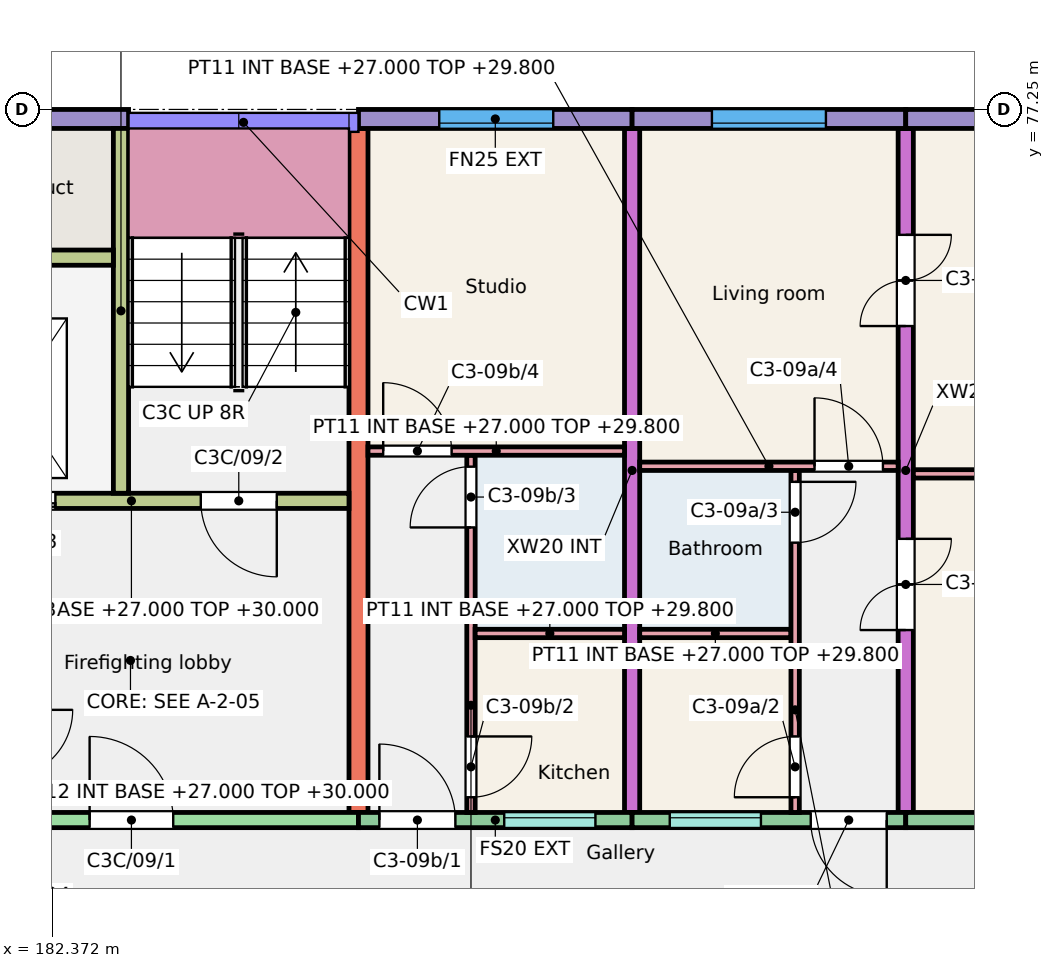
"""IFC4 building model, lengths in metres.
Left out: names, types, materials, properties, quantities, classifications, styles, units other than length and angle.
Written with IfcOpenShell. Run it as: python <this file> out.ifc"""

import sys

from ifc_helpers import new_model, si_unit, direction, frame, frame_2d, origin, place, context, subcontext, project, spatial, rectangle, extrude, element, fill, save


model = new_model("IFC4")
c1 = context("Model", 3, precision=1e-05, world=origin(), true_north=direction((0.0, 1.0)))
c2 = subcontext(c1, "Body", "Model", "MODEL_VIEW")
j1 = project(units=[si_unit("LENGTHUNIT", "METRE"), si_unit("PLANEANGLEUNIT", "RADIAN")], contexts=[c1])
p1 = place(None, origin())
s1 = spatial("IfcSite", under=j1, at=p1, CompositionType="ELEMENT")
p2 = place(p1, origin())
s2 = spatial("IfcBuilding", under=s1, at=p2, CompositionType="ELEMENT")
p3 = place(p2, frame((0.0, 0.0, 27.0)))
s3 = spatial("IfcBuildingStorey", under=s2, at=p3, CompositionType="ELEMENT", Elevation=27.0)
p4 = place(p3, frame((186.4, 68.0, 0.0), z_axis=(0.0, 0.0, 1.0), x_axis=(0.0, 1.0, 0.0)))
e1 = element("IfcWall", 1, at=p4, inside=s3, PredefinedType="SHEAR", context=c2, shape_type="SweptSolid", body=[
    extrude(rectangle(XDim=9.0, YDim=0.25, at=frame_2d((4.5, 0.0))), origin(), (0.0, 0.0, 1.0), 3.0),
])
p5 = place(p3, frame((190.0, 68.0, 0.0), z_axis=(0.0, 0.0, 1.0), x_axis=(0.0, 1.0, 0.0)))
e2 = element("IfcWall", 2, at=p5, inside=s3, PredefinedType="SHEAR", context=c2, shape_type="SweptSolid", body=[
    extrude(rectangle(XDim=9.0, YDim=0.2, at=frame_2d((4.5, 0.0))), origin(), (0.0, 0.0, 1.0), 3.0),
])
p6 = place(p3, frame((193.6, 68.0, 0.0), z_axis=(0.0, 0.0, 1.0), x_axis=(0.0, 1.0, 0.0)))
e3 = element("IfcWall", 3, at=p6, inside=s3, PredefinedType="SHEAR", context=c2, shape_type="SweptSolid", body=[
    extrude(rectangle(XDim=9.0, YDim=0.2, at=frame_2d((4.5, 0.0))), origin(), (0.0, 0.0, 1.0), 3.0),
])
p7 = place(p6, frame((2.4, 0.0, 0.0)))
e4 = element("IfcOpeningElement", 4, at=p7, cuts=e3, PredefinedType="OPENING", context=c2, shape_type="SweptSolid", body=[
    extrude(rectangle(XDim=1.2, YDim=2.1, at=frame_2d((0.6, 1.05))), frame((0.0, 0.11, 0.0), z_axis=(0.0, -1.0, 0.0), x_axis=(1.0, 0.0, 0.0)), (0.0, 0.0, 1.0), 0.22),
])
p8 = place(p6, frame((6.4, 0.0, 0.0)))
e5 = element("IfcOpeningElement", 5, at=p8, cuts=e3, PredefinedType="OPENING", context=c2, shape_type="SweptSolid", body=[
    extrude(rectangle(XDim=1.2, YDim=2.1, at=frame_2d((0.6, 1.05))), frame((0.0, 0.11, 0.0), z_axis=(0.0, -1.0, 0.0), x_axis=(1.0, 0.0, 0.0)), (0.0, 0.0, 1.0), 0.22),
])
p9 = place(p3, frame((180.4, 77.125, 0.0), z_axis=(0.0, 0.0, 1.0), x_axis=(1.0, 0.0, 0.0)))
e6 = element("IfcWall", 6, at=p9, inside=s3, PredefinedType="SOLIDWALL", context=c2, shape_type="SweptSolid", body=[
    extrude(rectangle(XDim=2.975, YDim=0.25, at=frame_2d((1.488, 0.0))), origin(), (0.0, 0.0, 1.0), 3.0),
])
p10 = place(p3, frame((180.55, 67.9, 0.0), z_axis=(0.0, 0.0, 1.0), x_axis=(1.0, 0.0, 0.0)))
e7 = element("IfcWall", 7, at=p10, inside=s3, PredefinedType="SHEAR", context=c2, shape_type="SweptSolid", body=[
    extrude(rectangle(XDim=5.85, YDim=0.2, at=frame_2d((2.925, 0.0))), origin(), (0.0, 0.0, 1.0), 3.0),
])
p11 = place(p10, frame((2.312, 0.0, 0.0)))
e8 = element("IfcOpeningElement", 8, at=p11, cuts=e7, PredefinedType="OPENING", context=c2, shape_type="SweptSolid", body=[
    extrude(rectangle(XDim=1.1, YDim=2.1, at=frame_2d((0.55, 1.05))), frame((0.0, 0.11, 0.0), z_axis=(0.0, -1.0, 0.0), x_axis=(1.0, 0.0, 0.0)), (0.0, 0.0, 1.0), 0.22),
])
p12 = place(p3, frame((180.55, 72.1, 0.0), z_axis=(0.0, 0.0, 1.0), x_axis=(1.0, 0.0, 0.0)))
e9 = element("IfcWall", 9, at=p12, inside=s3, PredefinedType="SHEAR", context=c2, shape_type="SweptSolid", body=[
    extrude(rectangle(XDim=5.725, YDim=0.2, at=frame_2d((2.862, 0.0))), origin(), (0.0, 0.0, 1.0), 3.0),
])
p13 = place(p12, frame((3.775, 0.0, 0.0)))
e10 = element("IfcOpeningElement", 10, at=p13, cuts=e9, PredefinedType="OPENING", context=c2, shape_type="SweptSolid", body=[
    extrude(rectangle(XDim=1.0, YDim=2.1, at=frame_2d((0.5, 1.05))), frame((0.0, 0.11, 0.0), z_axis=(0.0, -1.0, 0.0), x_axis=(1.0, 0.0, 0.0)), (0.0, 0.0, 1.0), 0.22),
])
p14 = place(p12, frame((0.762, 0.0, 0.0)))
e11 = element("IfcOpeningElement", 11, at=p14, cuts=e9, PredefinedType="OPENING", context=c2, shape_type="SweptSolid", body=[
    extrude(rectangle(XDim=1.1, YDim=2.1, at=frame_2d((0.55, 1.05))), frame((0.0, 0.11, 0.0), z_axis=(0.0, -1.0, 0.0), x_axis=(1.0, 0.0, 0.0)), (0.0, 0.0, 1.0), 0.22),
])
p15 = place(p3, frame((183.275, 72.2, 0.0), z_axis=(0.0, 0.0, 1.0), x_axis=(0.0, 1.0, 0.0)))
e12 = element("IfcWall", 12, at=p15, inside=s3, PredefinedType="SHEAR", context=c2, shape_type="SweptSolid", body=[
    extrude(rectangle(XDim=4.8, YDim=0.2, at=frame_2d((2.4, 0.0))), origin(), (0.0, 0.0, 1.0), 3.0),
])
p16 = place(p3, frame((180.55, 75.3, 0.0), z_axis=(0.0, 0.0, 1.0), x_axis=(1.0, 0.0, 0.0)))
e13 = element("IfcWall", 13, at=p16, inside=s3, PredefinedType="SHEAR", context=c2, shape_type="SweptSolid", body=[
    extrude(rectangle(XDim=2.625, YDim=0.2, at=frame_2d((1.312, 0.0))), origin(), (0.0, 0.0, 1.0), 3.0),
])
p17 = place(p3, frame((186.4, 77.125, 0.0), z_axis=(0.0, 0.0, 1.0), x_axis=(1.0, 0.0, 0.0)))
e14 = element("IfcWall", 14, at=p17, inside=s3, PredefinedType="SOLIDWALL", context=c2, shape_type="SweptSolid", body=[
    extrude(rectangle(XDim=3.6, YDim=0.25, at=frame_2d((1.8, 0.0))), origin(), (0.0, 0.0, 1.0), 3.0),
])
p18 = place(p17, frame((1.062, 0.0, 0.9)))
e15 = element("IfcOpeningElement", 15, at=p18, cuts=e14, PredefinedType="OPENING", context=c2, shape_type="SweptSolid", body=[
    extrude(rectangle(XDim=1.5, YDim=1.5, at=frame_2d((0.75, 0.75))), frame((0.0, 0.135, 0.0), z_axis=(0.0, -1.0, 0.0), x_axis=(1.0, 0.0, 0.0)), (0.0, 0.0, 1.0), 0.27),
])
p19 = place(p3, frame((186.4, 67.9, 0.0), z_axis=(0.0, 0.0, 1.0), x_axis=(1.0, 0.0, 0.0)))
e16 = element("IfcWall", 16, at=p19, inside=s3, PredefinedType="SOLIDWALL", context=c2, shape_type="SweptSolid", body=[
    extrude(rectangle(XDim=3.6, YDim=0.2, at=frame_2d((1.8, 0.0))), origin(), (0.0, 0.0, 1.0), 3.0),
])
p20 = place(p19, frame((1.917, 0.0, 1.1)))
e17 = element("IfcOpeningElement", 17, at=p20, cuts=e16, PredefinedType="OPENING", context=c2, shape_type="SweptSolid", body=[
    extrude(rectangle(XDim=1.2, YDim=1.3, at=frame_2d((0.6, 0.65))), frame((0.0, 0.11, 0.0), z_axis=(0.0, -1.0, 0.0), x_axis=(1.0, 0.0, 0.0)), (0.0, 0.0, 1.0), 0.22),
])
p21 = place(p19, frame((0.275, 0.0, 0.0)))
e18 = element("IfcOpeningElement", 18, at=p21, cuts=e16, PredefinedType="OPENING", context=c2, shape_type="SweptSolid", body=[
    extrude(rectangle(XDim=1.0, YDim=2.1, at=frame_2d((0.5, 1.05))), frame((0.0, 0.11, 0.0), z_axis=(0.0, -1.0, 0.0), x_axis=(1.0, 0.0, 0.0)), (0.0, 0.0, 1.0), 0.22),
])
p22 = place(p3, frame((190.0, 77.125, 0.0), z_axis=(0.0, 0.0, 1.0), x_axis=(1.0, 0.0, 0.0)))
e19 = element("IfcWall", 19, at=p22, inside=s3, PredefinedType="SOLIDWALL", context=c2, shape_type="SweptSolid", body=[
    extrude(rectangle(XDim=3.6, YDim=0.25, at=frame_2d((1.8, 0.0))), origin(), (0.0, 0.0, 1.0), 3.0),
])
p23 = place(p22, frame((1.05, 0.0, 0.9)))
e20 = element("IfcOpeningElement", 20, at=p23, cuts=e19, PredefinedType="OPENING", context=c2, shape_type="SweptSolid", body=[
    extrude(rectangle(XDim=1.5, YDim=1.5, at=frame_2d((0.75, 0.75))), frame((0.0, 0.135, 0.0), z_axis=(0.0, -1.0, 0.0), x_axis=(1.0, 0.0, 0.0)), (0.0, 0.0, 1.0), 0.27),
])
p24 = place(p3, frame((190.0, 67.9, 0.0), z_axis=(0.0, 0.0, 1.0), x_axis=(1.0, 0.0, 0.0)))
e21 = element("IfcWall", 21, at=p24, inside=s3, PredefinedType="SOLIDWALL", context=c2, shape_type="SweptSolid", body=[
    extrude(rectangle(XDim=3.6, YDim=0.2, at=frame_2d((1.8, 0.0))), origin(), (0.0, 0.0, 1.0), 3.0),
])
p25 = place(p24, frame((0.495, 0.0, 1.1)))
e22 = element("IfcOpeningElement", 22, at=p25, cuts=e21, PredefinedType="OPENING", context=c2, shape_type="SweptSolid", body=[
    extrude(rectangle(XDim=1.2, YDim=1.3, at=frame_2d((0.6, 0.65))), frame((0.0, 0.11, 0.0), z_axis=(0.0, -1.0, 0.0), x_axis=(1.0, 0.0, 0.0)), (0.0, 0.0, 1.0), 0.22),
])
p26 = place(p24, frame((2.35, 0.0, 0.0)))
e23 = element("IfcOpeningElement", 23, at=p26, cuts=e21, PredefinedType="OPENING", context=c2, shape_type="SweptSolid", body=[
    extrude(rectangle(XDim=1.0, YDim=2.1, at=frame_2d((0.5, 1.05))), frame((0.0, 0.11, 0.0), z_axis=(0.0, -1.0, 0.0), x_axis=(1.0, 0.0, 0.0)), (0.0, 0.0, 1.0), 0.22),
])
p27 = place(p3, frame((193.6, 77.125, 0.0), z_axis=(0.0, 0.0, 1.0), x_axis=(1.0, 0.0, 0.0)))
e24 = element("IfcWall", 24, at=p27, inside=s3, PredefinedType="SOLIDWALL", context=c2, shape_type="SweptSolid", body=[
    extrude(rectangle(XDim=3.6, YDim=0.25, at=frame_2d((1.8, 0.0))), origin(), (0.0, 0.0, 1.0), 3.0),
])
p28 = place(p27, frame((1.025, 0.0, 0.9)))
e25 = element("IfcOpeningElement", 25, at=p28, cuts=e24, PredefinedType="OPENING", context=c2, shape_type="SweptSolid", body=[
    extrude(rectangle(XDim=1.5, YDim=1.5, at=frame_2d((0.75, 0.75))), frame((0.0, 0.135, 0.0), z_axis=(0.0, -1.0, 0.0), x_axis=(1.0, 0.0, 0.0)), (0.0, 0.0, 1.0), 0.27),
])
p29 = place(p3, frame((193.6, 67.9, 0.0), z_axis=(0.0, 0.0, 1.0), x_axis=(1.0, 0.0, 0.0)))
e26 = element("IfcWall", 26, at=p29, inside=s3, PredefinedType="SOLIDWALL", context=c2, shape_type="SweptSolid", body=[
    extrude(rectangle(XDim=3.45, YDim=0.2, at=frame_2d((1.725, 0.0))), origin(), (0.0, 0.0, 1.0), 3.0),
])
p30 = place(p29, frame((1.025, 0.0, 0.9)))
e27 = element("IfcOpeningElement", 27, at=p30, cuts=e26, PredefinedType="OPENING", context=c2, shape_type="SweptSolid", body=[
    extrude(rectangle(XDim=1.5, YDim=1.5, at=frame_2d((0.75, 0.75))), frame((0.0, 0.11, 0.0), z_axis=(0.0, -1.0, 0.0), x_axis=(1.0, 0.0, 0.0)), (0.0, 0.0, 1.0), 0.22),
])
p31 = place(p3, frame((190.1, 70.355, 0.0), z_axis=(0.0, 0.0, 1.0), x_axis=(1.0, 0.0, 0.0)))
e28 = element("IfcWall", 28, at=p31, inside=s3, PredefinedType="PARTITIONING", context=c2, shape_type="SweptSolid", body=[
    extrude(rectangle(XDim=1.99, YDim=0.11, at=frame_2d((0.995, 0.0))), origin(), (0.0, 0.0, 1.0), 2.8),
])
p32 = place(p3, frame((192.145, 68.0, 0.0), z_axis=(0.0, 0.0, 1.0), x_axis=(0.0, 1.0, 0.0)))
e29 = element("IfcWall", 29, at=p32, inside=s3, PredefinedType="PARTITIONING", context=c2, shape_type="SweptSolid", body=[
    extrude(rectangle(XDim=4.5, YDim=0.11, at=frame_2d((2.25, 0.0))), origin(), (0.0, 0.0, 1.0), 2.8),
])
p33 = place(p32, frame((0.2, 0.0, 0.0)))
e30 = element("IfcOpeningElement", 30, at=p33, cuts=e29, PredefinedType="OPENING", context=c2, shape_type="SweptSolid", body=[
    extrude(rectangle(XDim=0.8, YDim=2.1, at=frame_2d((0.4, 1.05))), frame((0.0, 0.065, 0.0), z_axis=(0.0, -1.0, 0.0), x_axis=(1.0, 0.0, 0.0)), (0.0, 0.0, 1.0), 0.13),
])
p34 = place(p32, frame((3.55, 0.0, 0.0)))
e31 = element("IfcOpeningElement", 31, at=p34, cuts=e29, PredefinedType="OPENING", context=c2, shape_type="SweptSolid", body=[
    extrude(rectangle(XDim=0.8, YDim=2.1, at=frame_2d((0.4, 1.05))), frame((0.0, 0.065, 0.0), z_axis=(0.0, -1.0, 0.0), x_axis=(1.0, 0.0, 0.0)), (0.0, 0.0, 1.0), 0.13),
])
p35 = place(p3, frame((190.1, 72.555, 0.0), z_axis=(0.0, 0.0, 1.0), x_axis=(1.0, 0.0, 0.0)))
e32 = element("IfcWall", 32, at=p35, inside=s3, PredefinedType="PARTITIONING", context=c2, shape_type="SweptSolid", body=[
    extrude(rectangle(XDim=3.4, YDim=0.11, at=frame_2d((1.7, 0.0))), origin(), (0.0, 0.0, 1.0), 2.8),
])
p36 = place(p35, frame((2.3, 0.0, 0.0)))
e33 = element("IfcOpeningElement", 33, at=p36, cuts=e32, PredefinedType="OPENING", context=c2, shape_type="SweptSolid", body=[
    extrude(rectangle(XDim=0.9, YDim=2.1, at=frame_2d((0.45, 1.05))), frame((0.0, 0.065, 0.0), z_axis=(0.0, -1.0, 0.0), x_axis=(1.0, 0.0, 0.0)), (0.0, 0.0, 1.0), 0.13),
])
p37 = place(p3, frame((193.7, 72.455, 0.0), z_axis=(0.0, 0.0, 1.0), x_axis=(1.0, 0.0, 0.0)))
e34 = element("IfcWall", 34, at=p37, inside=s3, PredefinedType="PARTITIONING", context=c2, shape_type="SweptSolid", body=[
    extrude(rectangle(XDim=3.35, YDim=0.11, at=frame_2d((1.675, 0.0))), origin(), (0.0, 0.0, 1.0), 2.75),
])
p38 = place(p3, frame((187.88, 68.0, 0.0), z_axis=(0.0, 0.0, 1.0), x_axis=(0.0, 1.0, 0.0)))
e35 = element("IfcWall", 35, at=p38, inside=s3, PredefinedType="PARTITIONING", context=c2, shape_type="SweptSolid", body=[
    extrude(rectangle(XDim=4.7, YDim=0.11, at=frame_2d((2.35, 0.0))), origin(), (0.0, 0.0, 1.0), 2.8),
])
p39 = place(p38, frame((0.2, 0.0, 0.0)))
e36 = element("IfcOpeningElement", 36, at=p39, cuts=e35, PredefinedType="OPENING", context=c2, shape_type="SweptSolid", body=[
    extrude(rectangle(XDim=0.8, YDim=2.1, at=frame_2d((0.4, 1.05))), frame((0.0, 0.065, 0.0), z_axis=(0.0, -1.0, 0.0), x_axis=(1.0, 0.0, 0.0)), (0.0, 0.0, 1.0), 0.13),
])
p40 = place(p38, frame((3.75, 0.0, 0.0)))
e37 = element("IfcOpeningElement", 37, at=p40, cuts=e35, PredefinedType="OPENING", context=c2, shape_type="SweptSolid", body=[
    extrude(rectangle(XDim=0.8, YDim=2.1, at=frame_2d((0.4, 1.05))), frame((0.0, 0.065, 0.0), z_axis=(0.0, -1.0, 0.0), x_axis=(1.0, 0.0, 0.0)), (0.0, 0.0, 1.0), 0.13),
])
p41 = place(p3, frame((187.935, 70.355, 0.0), z_axis=(0.0, 0.0, 1.0), x_axis=(1.0, 0.0, 0.0)))
e38 = element("IfcWall", 38, at=p41, inside=s3, PredefinedType="PARTITIONING", context=c2, shape_type="SweptSolid", body=[
    extrude(rectangle(XDim=1.965, YDim=0.11, at=frame_2d((0.982, 0.0))), origin(), (0.0, 0.0, 1.0), 2.8),
])
p42 = place(p3, frame((186.525, 72.755, 0.0), z_axis=(0.0, 0.0, 1.0), x_axis=(1.0, 0.0, 0.0)))
e39 = element("IfcWall", 39, at=p42, inside=s3, PredefinedType="PARTITIONING", context=c2, shape_type="SweptSolid", body=[
    extrude(rectangle(XDim=3.375, YDim=0.11, at=frame_2d((1.688, 0.0))), origin(), (0.0, 0.0, 1.0), 2.8),
])
p43 = place(p42, frame((0.2, 0.0, 0.0)))
e40 = element("IfcOpeningElement", 40, at=p43, cuts=e39, PredefinedType="OPENING", context=c2, shape_type="SweptSolid", body=[
    extrude(rectangle(XDim=0.9, YDim=2.1, at=frame_2d((0.45, 1.05))), frame((0.0, 0.065, 0.0), z_axis=(0.0, -1.0, 0.0), x_axis=(1.0, 0.0, 0.0)), (0.0, 0.0, 1.0), 0.13),
])
p44 = place(p25, origin())
e41 = element("IfcWindow", 41, at=p44, inside=s3, PartitioningType="SINGLE_PANEL", PredefinedType="WINDOW", context=c2, shape_type="SweptSolid", body=[
    extrude(rectangle(XDim=1.2, YDim=1.3, at=frame_2d((0.6, 0.65))), frame((0.0, 0.06, 0.0), z_axis=(0.0, -1.0, 0.0), x_axis=(1.0, 0.0, 0.0)), (0.0, 0.0, 1.0), 0.06),
])
fill(e22, e41)
p45 = place(p23, origin())
e42 = element("IfcWindow", 42, at=p45, inside=s3, PartitioningType="SINGLE_PANEL", PredefinedType="WINDOW", context=c2, shape_type="SweptSolid", body=[
    extrude(rectangle(XDim=1.5, YDim=1.5, at=frame_2d((0.75, 0.75))), frame((0.0, -0.025, 0.0), z_axis=(0.0, -1.0, 0.0), x_axis=(1.0, 0.0, 0.0)), (0.0, 0.0, 1.0), 0.06),
])
fill(e20, e42)
p46 = place(p20, origin())
e43 = element("IfcWindow", 43, at=p46, inside=s3, PartitioningType="SINGLE_PANEL", PredefinedType="WINDOW", context=c2, shape_type="SweptSolid", body=[
    extrude(rectangle(XDim=1.2, YDim=1.3, at=frame_2d((0.6, 0.65))), frame((0.0, 0.06, 0.0), z_axis=(0.0, -1.0, 0.0), x_axis=(1.0, 0.0, 0.0)), (0.0, 0.0, 1.0), 0.06),
])
fill(e17, e43)
p47 = place(p18, origin())
e44 = element("IfcWindow", 44, at=p47, inside=s3, PartitioningType="SINGLE_PANEL", PredefinedType="WINDOW", context=c2, shape_type="SweptSolid", body=[
    extrude(rectangle(XDim=1.5, YDim=1.5, at=frame_2d((0.75, 0.75))), frame((0.0, -0.025, 0.0), z_axis=(0.0, -1.0, 0.0), x_axis=(1.0, 0.0, 0.0)), (0.0, 0.0, 1.0), 0.06),
])
fill(e15, e44)
p48 = place(p26, origin())
e45 = element("IfcDoor", 45, at=p48, inside=s3, OperationType="SINGLE_SWING_RIGHT", PredefinedType="DOOR", context=c2, shape_type="SweptSolid", body=[
    extrude(rectangle(XDim=1.0, YDim=2.1, at=frame_2d((0.5, 1.05))), frame((0.0, 0.025, 0.0), z_axis=(0.0, -1.0, 0.0), x_axis=(1.0, 0.0, 0.0)), (0.0, 0.0, 1.0), 0.05),
])
fill(e23, e45)
p49 = place(p33, origin())
e46 = element("IfcDoor", 46, at=p49, inside=s3, OperationType="SINGLE_SWING_LEFT", PredefinedType="DOOR", context=c2, shape_type="SweptSolid", body=[
    extrude(rectangle(XDim=0.8, YDim=2.1, at=frame_2d((0.4, 1.05))), frame((0.0, 0.025, 0.0), z_axis=(0.0, -1.0, 0.0), x_axis=(1.0, 0.0, 0.0)), (0.0, 0.0, 1.0), 0.05),
])
fill(e30, e46)
p50 = place(p34, origin())
e47 = element("IfcDoor", 47, at=p50, inside=s3, OperationType="SINGLE_SWING_RIGHT", PredefinedType="DOOR", context=c2, shape_type="SweptSolid", body=[
    extrude(rectangle(XDim=0.8, YDim=2.1, at=frame_2d((0.4, 1.05))), frame((0.0, 0.025, 0.0), z_axis=(0.0, -1.0, 0.0), x_axis=(1.0, 0.0, 0.0)), (0.0, 0.0, 1.0), 0.05),
])
fill(e31, e47)
p51 = place(p36, origin())
e48 = element("IfcDoor", 48, at=p51, inside=s3, OperationType="SINGLE_SWING_LEFT", PredefinedType="DOOR", context=c2, shape_type="SweptSolid", body=[
    extrude(rectangle(XDim=0.9, YDim=2.1, at=frame_2d((0.45, 1.05))), frame((0.0, 0.025, 0.0), z_axis=(0.0, -1.0, 0.0), x_axis=(1.0, 0.0, 0.0)), (0.0, 0.0, 1.0), 0.05),
])
fill(e33, e48)
p52 = place(p7, origin())
e49 = element("IfcDoor", 49, at=p52, inside=s3, OperationType="DOUBLE_DOOR_SINGLE_SWING", PredefinedType="DOOR", context=c2, shape_type="SweptSolid", body=[
    extrude(rectangle(XDim=1.2, YDim=2.1, at=frame_2d((0.6, 1.05))), frame((0.0, 0.025, 0.0), z_axis=(0.0, -1.0, 0.0), x_axis=(1.0, 0.0, 0.0)), (0.0, 0.0, 1.0), 0.05),
])
fill(e4, e49)
p53 = place(p8, origin())
e50 = element("IfcDoor", 50, at=p53, inside=s3, OperationType="DOUBLE_DOOR_SINGLE_SWING", PredefinedType="DOOR", context=c2, shape_type="SweptSolid", body=[
    extrude(rectangle(XDim=1.2, YDim=2.1, at=frame_2d((0.6, 1.05))), frame((0.0, 0.025, 0.0), z_axis=(0.0, -1.0, 0.0), x_axis=(1.0, 0.0, 0.0)), (0.0, 0.0, 1.0), 0.05),
])
fill(e5, e50)
p54 = place(p21, origin())
e51 = element("IfcDoor", 51, at=p54, inside=s3, OperationType="SINGLE_SWING_LEFT", PredefinedType="DOOR", context=c2, shape_type="SweptSolid", body=[
    extrude(rectangle(XDim=1.0, YDim=2.1, at=frame_2d((0.5, 1.05))), frame((0.0, 0.025, 0.0), z_axis=(0.0, -1.0, 0.0), x_axis=(1.0, 0.0, 0.0)), (0.0, 0.0, 1.0), 0.05),
])
fill(e18, e51)
p55 = place(p39, origin())
e52 = element("IfcDoor", 52, at=p55, inside=s3, OperationType="SINGLE_SWING_RIGHT", PredefinedType="DOOR", context=c2, shape_type="SweptSolid", body=[
    extrude(rectangle(XDim=0.8, YDim=2.1, at=frame_2d((0.4, 1.05))), frame((0.0, 0.025, 0.0), z_axis=(0.0, -1.0, 0.0), x_axis=(1.0, 0.0, 0.0)), (0.0, 0.0, 1.0), 0.05),
])
fill(e36, e52)
p56 = place(p40, origin())
e53 = element("IfcDoor", 53, at=p56, inside=s3, OperationType="SINGLE_SWING_LEFT", PredefinedType="DOOR", context=c2, shape_type="SweptSolid", body=[
    extrude(rectangle(XDim=0.8, YDim=2.1, at=frame_2d((0.4, 1.05))), frame((0.0, 0.025, 0.0), z_axis=(0.0, -1.0, 0.0), x_axis=(1.0, 0.0, 0.0)), (0.0, 0.0, 1.0), 0.05),
])
fill(e37, e53)
p57 = place(p43, origin())
e54 = element("IfcDoor", 54, at=p57, inside=s3, OperationType="SINGLE_SWING_LEFT", PredefinedType="DOOR", context=c2, shape_type="SweptSolid", body=[
    extrude(rectangle(XDim=0.9, YDim=2.1, at=frame_2d((0.45, 1.05))), frame((0.0, 0.025, 0.0), z_axis=(0.0, -1.0, 0.0), x_axis=(1.0, 0.0, 0.0)), (0.0, 0.0, 1.0), 0.05),
])
fill(e40, e54)
p58 = place(p11, origin())
e55 = element("IfcDoor", 55, at=p58, inside=s3, OperationType="SINGLE_SWING_LEFT", PredefinedType="DOOR", context=c2, shape_type="SweptSolid", body=[
    extrude(rectangle(XDim=1.1, YDim=2.1, at=frame_2d((0.55, 1.05))), frame((0.0, 0.025, 0.0), z_axis=(0.0, -1.0, 0.0), x_axis=(1.0, 0.0, 0.0)), (0.0, 0.0, 1.0), 0.05),
])
fill(e8, e55)
p59 = place(p13, origin())
e56 = element("IfcDoor", 56, at=p59, inside=s3, OperationType="SINGLE_SWING_RIGHT", PredefinedType="DOOR", context=c2, shape_type="SweptSolid", body=[
    extrude(rectangle(XDim=1.0, YDim=2.1, at=frame_2d((0.5, 1.05))), frame((0.0, 0.025, 0.0), z_axis=(0.0, -1.0, 0.0), x_axis=(1.0, 0.0, 0.0)), (0.0, 0.0, 1.0), 0.05),
])
fill(e10, e56)
p60 = place(p14, origin())
e57 = element("IfcDoor", 57, at=p60, inside=s3, OperationType="DOUBLE_DOOR_SLIDING", PredefinedType="DOOR", context=c2, shape_type="SweptSolid", body=[
    extrude(rectangle(XDim=1.1, YDim=2.1, at=frame_2d((0.55, 1.05))), frame((0.0, 0.025, 0.0), z_axis=(0.0, -1.0, 0.0), x_axis=(1.0, 0.0, 0.0)), (0.0, 0.0, 1.0), 0.05),
])
fill(e11, e57)
save(model, sys.argv[1])
